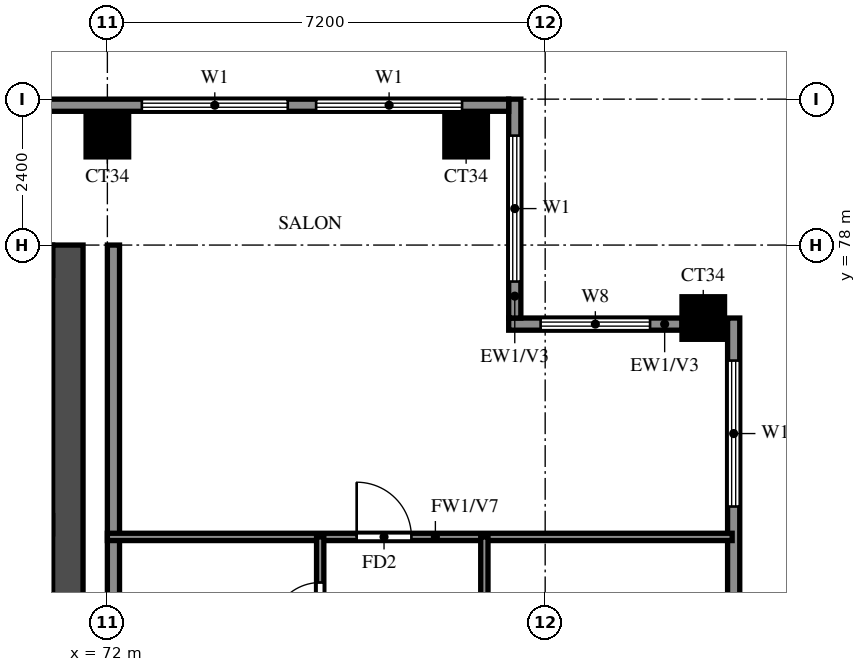
"""IFC4 building model, lengths in metres.
Left out: names, types, materials, properties, quantities, classifications, styles, units other than length and angle.
Written with IfcOpenShell. Run it as: python <this file> out.ifc"""

import sys

from ifc_helpers import new_model, si_unit, direction, frame, frame_2d, origin, origin_2d, place, context, subcontext, project, spatial, rectangle, extrude, source, transform, mapped, element, fill, save


model = new_model("IFC4")
c1 = context("Model", 3, precision=1e-05, world=origin(), true_north=direction((0.0, 1.0)))
c2 = subcontext(c1, "Body", "Model", "MODEL_VIEW")
j1 = project(units=[si_unit("LENGTHUNIT", "METRE"), si_unit("PLANEANGLEUNIT", "RADIAN")], contexts=[c1])
p1 = place(None, origin())
s1 = spatial("IfcSite", under=j1, at=p1, CompositionType="ELEMENT")
p2 = place(p1, origin())
s2 = spatial("IfcBuilding", under=s1, at=p2, CompositionType="ELEMENT")
p3 = place(p2, frame((0.0, 0.0, 218.5)))
s3 = spatial("IfcBuildingStorey", under=s2, at=p3, CompositionType="ELEMENT", Elevation=218.5)
m1 = source(origin(), c2, "Body", "SweptSolid", [
    extrude(rectangle(XDim=0.7, YDim=0.7, at=origin_2d()), origin(), (0.0, 0.0, 1.0), 3.22),
])
for number, where, z_axis, x_axis in (
    (1, (81.8, 76.8, 0.0), (0.0, 0.0, 1.0), (1.0, 0.0, 0.0)),
    (2, (72.0, 79.8, 0.0), (0.0, 0.0, 1.0), (1.0, 0.0, 0.0)),
    (3, (77.9, 79.8, 0.0), (0.0, 0.0, 1.0), (1.0, 0.0, 0.0)),
):
    element("IfcColumn", number, at=place(p3, frame(where, z_axis=z_axis, x_axis=x_axis)), inside=s3, PredefinedType="COLUMN", context=c2, shape_type="MappedRepresentation", body=[
        mapped(m1, transform((0.0, 0.0, 0.0))),
    ])
p4 = place(p3, frame((71.35, 66.15, 0.0), z_axis=(0.0, 0.0, 1.0), x_axis=(0.0, 1.0, 0.0)))
e4 = element("IfcWall", 4, at=p4, inside=s3, PredefinedType="SHEAR", context=c2, shape_type="SweptSolid", body=[
    extrude(rectangle(XDim=11.85, YDim=0.5, at=frame_2d((5.925, 0.0))), origin(), (0.0, 0.0, 1.0), 3.22),
])
p5 = place(p3, frame((29.7, 77.75, 0.0), z_axis=(0.0, 0.0, 1.0), x_axis=(1.0, 0.0, 0.0)))
e5 = element("IfcWall", 5, at=p5, inside=s3, PredefinedType="SHEAR", context=c2, shape_type="SweptSolid", body=[
    extrude(rectangle(XDim=41.4, YDim=0.5, at=frame_2d((20.7, 0.0))), origin(), (0.0, 0.0, 1.0), 3.22),
])
p6 = place(p3, frame((82.3, 62.4, 0.0), z_axis=(0.0, 0.0, 1.0), x_axis=(0.0, 1.0, 0.0)))
e6 = element("IfcWall", 6, at=p6, inside=s3, PredefinedType="SOLIDWALL", context=c2, shape_type="SweptSolid", body=[
    extrude(rectangle(XDim=14.4, YDim=0.2, at=frame_2d((7.2, 0.0))), origin(), (0.0, 0.0, 1.0), 3.22),
])
p7 = place(p6, frame((0.967, 0.0, 0.6)))
e7 = element("IfcOpeningElement", 7, at=p7, cuts=e6, PredefinedType="OPENING", context=c2, shape_type="SweptSolid", body=[
    extrude(rectangle(XDim=2.4, YDim=2.4, at=frame_2d((1.2, 1.2))), frame((0.0, 0.11, 0.0), z_axis=(0.0, -1.0, 0.0), x_axis=(1.0, 0.0, 0.0)), (0.0, 0.0, 1.0), 0.22),
])
p8 = place(p6, frame((4.033, 0.0, 0.6)))
e8 = element("IfcOpeningElement", 8, at=p8, cuts=e6, PredefinedType="OPENING", context=c2, shape_type="SweptSolid", body=[
    extrude(rectangle(XDim=2.4, YDim=2.4, at=frame_2d((1.2, 1.2))), frame((0.0, 0.11, 0.0), z_axis=(0.0, -1.0, 0.0), x_axis=(1.0, 0.0, 0.0)), (0.0, 0.0, 1.0), 0.22),
])
p9 = place(p6, frame((8.55, 0.0, 1.5)))
e9 = element("IfcOpeningElement", 9, at=p9, cuts=e6, PredefinedType="OPENING", context=c2, shape_type="SweptSolid", body=[
    extrude(rectangle(XDim=0.9, YDim=0.9, at=frame_2d((0.45, 0.45))), frame((0.0, 0.11, 0.0), z_axis=(0.0, -1.0, 0.0), x_axis=(1.0, 0.0, 0.0)), (0.0, 0.0, 1.0), 0.22),
])
p10 = place(p6, frame((11.3, 0.0, 0.6)))
e10 = element("IfcOpeningElement", 10, at=p10, cuts=e6, PredefinedType="OPENING", context=c2, shape_type="SweptSolid", body=[
    extrude(rectangle(XDim=2.4, YDim=2.4, at=frame_2d((1.2, 1.2))), frame((0.0, 0.11, 0.0), z_axis=(0.0, -1.0, 0.0), x_axis=(1.0, 0.0, 0.0)), (0.0, 0.0, 1.0), 0.22),
])
p11 = place(p3, frame((81.45, 76.7, 0.0), z_axis=(0.0, 0.0, 1.0), x_axis=(-1.0, 0.0, 0.0)))
e11 = element("IfcWall", 11, at=p11, inside=s3, PredefinedType="SOLIDWALL", context=c2, shape_type="SweptSolid", body=[
    extrude(rectangle(XDim=2.85, YDim=0.2, at=frame_2d((1.425, 0.0))), origin(), (0.0, 0.0, 1.0), 3.22),
])
p12 = place(p11, frame((0.525, 0.0, 0.6)))
e12 = element("IfcOpeningElement", 12, at=p12, cuts=e11, PredefinedType="OPENING", context=c2, shape_type="SweptSolid", body=[
    extrude(rectangle(XDim=1.8, YDim=2.4, at=frame_2d((0.9, 1.2))), frame((0.0, 0.11, 0.0), z_axis=(0.0, -1.0, 0.0), x_axis=(1.0, 0.0, 0.0)), (0.0, 0.0, 1.0), 0.22),
])
p13 = place(p3, frame((78.7, 76.8, 0.0), z_axis=(0.0, 0.0, 1.0), x_axis=(0.0, 1.0, 0.0)))
e13 = element("IfcWall", 13, at=p13, inside=s3, PredefinedType="SOLIDWALL", context=c2, shape_type="SweptSolid", body=[
    extrude(rectangle(XDim=3.6, YDim=0.2, at=frame_2d((1.8, 0.0))), origin(), (0.0, 0.0, 1.0), 3.22),
])
p14 = place(p13, frame((0.6, 0.0, 0.6)))
e14 = element("IfcOpeningElement", 14, at=p14, cuts=e13, PredefinedType="OPENING", context=c2, shape_type="SweptSolid", body=[
    extrude(rectangle(XDim=2.4, YDim=2.4, at=frame_2d((1.2, 1.2))), frame((0.0, 0.11, 0.0), z_axis=(0.0, -1.0, 0.0), x_axis=(1.0, 0.0, 0.0)), (0.0, 0.0, 1.0), 0.22),
])
p15 = place(p3, frame((78.6, 80.3, 0.0), z_axis=(0.0, 0.0, 1.0), x_axis=(-1.0, 0.0, 0.0)))
e15 = element("IfcWall", 15, at=p15, inside=s3, PredefinedType="SOLIDWALL", context=c2, shape_type="SweptSolid", body=[
    extrude(rectangle(XDim=56.6, YDim=0.2, at=frame_2d((28.3, 0.0))), origin(), (0.0, 0.0, 1.0), 3.22),
])
p16 = place(p15, frame((50.7, 0.0, 0.0)))
e16 = element("IfcOpeningElement", 16, at=p16, cuts=e15, PredefinedType="OPENING", context=c2, shape_type="SweptSolid", body=[
    extrude(rectangle(XDim=1.8, YDim=2.4, at=frame_2d((0.9, 1.2))), frame((0.0, 0.11, 0.0), z_axis=(0.0, -1.0, 0.0), x_axis=(1.0, 0.0, 0.0)), (0.0, 0.0, 1.0), 0.22),
])
p17 = place(p15, frame((52.95, 0.0, 0.6)))
e17 = element("IfcOpeningElement", 17, at=p17, cuts=e15, PredefinedType="OPENING", context=c2, shape_type="SweptSolid", body=[
    extrude(rectangle(XDim=0.9, YDim=2.4, at=frame_2d((0.45, 1.2))), frame((0.0, 0.11, 0.0), z_axis=(0.0, -1.0, 0.0), x_axis=(1.0, 0.0, 0.0)), (0.0, 0.0, 1.0), 0.22),
])
p18 = place(p15, frame((54.9, 0.0, 0.6)))
e18 = element("IfcOpeningElement", 18, at=p18, cuts=e15, PredefinedType="OPENING", context=c2, shape_type="SweptSolid", body=[
    extrude(rectangle(XDim=1.2, YDim=2.4, at=frame_2d((0.6, 1.2))), frame((0.0, 0.11, 0.0), z_axis=(0.0, -1.0, 0.0), x_axis=(1.0, 0.0, 0.0)), (0.0, 0.0, 1.0), 0.22),
])
p19 = place(p15, frame((0.767, 0.0, 0.6)))
e19 = element("IfcOpeningElement", 19, at=p19, cuts=e15, PredefinedType="OPENING", context=c2, shape_type="SweptSolid", body=[
    extrude(rectangle(XDim=2.4, YDim=2.4, at=frame_2d((1.2, 1.2))), frame((0.0, 0.11, 0.0), z_axis=(0.0, -1.0, 0.0), x_axis=(1.0, 0.0, 0.0)), (0.0, 0.0, 1.0), 0.22),
])
p20 = place(p15, frame((3.633, 0.0, 0.6)))
e20 = element("IfcOpeningElement", 20, at=p20, cuts=e15, PredefinedType="OPENING", context=c2, shape_type="SweptSolid", body=[
    extrude(rectangle(XDim=2.4, YDim=2.4, at=frame_2d((1.2, 1.2))), frame((0.0, 0.11, 0.0), z_axis=(0.0, -1.0, 0.0), x_axis=(1.0, 0.0, 0.0)), (0.0, 0.0, 1.0), 0.22),
])
p21 = place(p3, frame((72.1, 62.4, 0.0), z_axis=(0.0, 0.0, 1.0), x_axis=(0.0, 1.0, 0.0)))
e21 = element("IfcWall", 21, at=p21, inside=s3, PredefinedType="SOLIDWALL", context=c2, shape_type="SweptSolid", body=[
    extrude(rectangle(XDim=15.6, YDim=0.2, at=frame_2d((7.8, 0.0))), origin(), (0.0, 0.0, 1.0), 3.22),
])
p22 = place(p3, frame((72.0, 73.2, 0.0), z_axis=(0.0, 0.0, 1.0), x_axis=(1.0, 0.0, 0.0)))
e22 = element("IfcWall", 22, at=p22, inside=s3, PredefinedType="PARTITIONING", context=c2, shape_type="SweptSolid", body=[
    extrude(rectangle(XDim=10.275, YDim=0.12, at=frame_2d((5.137, 0.0))), origin(), (0.0, 0.0, 1.0), 2.32),
])
p23 = place(p22, frame((4.1, 0.0, 0.0)))
e23 = element("IfcOpeningElement", 23, at=p23, cuts=e22, PredefinedType="OPENING", context=c2, shape_type="SweptSolid", body=[
    extrude(rectangle(XDim=0.9, YDim=2.1, at=frame_2d((0.45, 1.05))), frame((0.0, 0.07, 0.0), z_axis=(0.0, -1.0, 0.0), x_axis=(1.0, 0.0, 0.0)), (0.0, 0.0, 1.0), 0.14),
])
p24 = place(p3, frame((75.5, 61.2, 0.0), z_axis=(0.0, 0.0, 1.0), x_axis=(0.0, 1.0, 0.0)))
e24 = element("IfcWall", 24, at=p24, inside=s3, PredefinedType="PARTITIONING", context=c2, shape_type="SweptSolid", body=[
    extrude(rectangle(XDim=12.0, YDim=0.12, at=frame_2d((6.0, 0.0))), origin(), (0.0, 0.0, 1.0), 3.22),
])
p25 = place(p24, frame((4.2, 0.0, 0.0)))
e25 = element("IfcOpeningElement", 25, at=p25, cuts=e24, PredefinedType="OPENING", context=c2, shape_type="SweptSolid", body=[
    extrude(rectangle(XDim=0.9, YDim=2.1, at=frame_2d((0.45, 1.05))), frame((0.0, 0.07, 0.0), z_axis=(0.0, -1.0, 0.0), x_axis=(1.0, 0.0, 0.0)), (0.0, 0.0, 1.0), 0.14),
])
p26 = place(p24, frame((7.975, 0.0, 0.0)))
e26 = element("IfcOpeningElement", 26, at=p26, cuts=e24, PredefinedType="OPENING", context=c2, shape_type="SweptSolid", body=[
    extrude(rectangle(XDim=0.8, YDim=2.1, at=frame_2d((0.4, 1.05))), frame((0.0, 0.07, 0.0), z_axis=(0.0, -1.0, 0.0), x_axis=(1.0, 0.0, 0.0)), (0.0, 0.0, 1.0), 0.14),
])
p27 = place(p24, frame((10.45, 0.0, 0.0)))
e27 = element("IfcOpeningElement", 27, at=p27, cuts=e24, PredefinedType="OPENING", context=c2, shape_type="SweptSolid", body=[
    extrude(rectangle(XDim=0.8, YDim=2.1, at=frame_2d((0.4, 1.05))), frame((0.0, 0.07, 0.0), z_axis=(0.0, -1.0, 0.0), x_axis=(1.0, 0.0, 0.0)), (0.0, 0.0, 1.0), 0.14),
])
p28 = place(p3, frame((78.2, 69.6, 0.0), z_axis=(0.0, 0.0, 1.0), x_axis=(0.0, 1.0, 0.0)))
e28 = element("IfcWall", 28, at=p28, inside=s3, PredefinedType="PARTITIONING", context=c2, shape_type="SweptSolid", body=[
    extrude(rectangle(XDim=3.6, YDim=0.12, at=frame_2d((1.8, 0.0))), origin(), (0.0, 0.0, 1.0), 3.22),
])
p29 = place(p10, origin())
e29 = element("IfcWindow", 29, at=p29, inside=s3, PartitioningType="DOUBLE_PANEL_VERTICAL", PredefinedType="WINDOW", context=c2, shape_type="SweptSolid", body=[
    extrude(rectangle(XDim=2.4, YDim=2.4, at=frame_2d((1.2, 1.2))), frame((0.0, 0.03, 0.0), z_axis=(0.0, -1.0, 0.0), x_axis=(1.0, 0.0, 0.0)), (0.0, 0.0, 1.0), 0.06),
])
fill(e10, e29)
p30 = place(p12, origin())
e30 = element("IfcWindow", 30, at=p30, inside=s3, PartitioningType="DOUBLE_PANEL_VERTICAL", PredefinedType="WINDOW", context=c2, shape_type="SweptSolid", body=[
    extrude(rectangle(XDim=1.8, YDim=2.4, at=frame_2d((0.9, 1.2))), frame((0.0, 0.03, 0.0), z_axis=(0.0, -1.0, 0.0), x_axis=(1.0, 0.0, 0.0)), (0.0, 0.0, 1.0), 0.06),
])
fill(e12, e30)
p31 = place(p14, origin())
e31 = element("IfcWindow", 31, at=p31, inside=s3, PartitioningType="DOUBLE_PANEL_VERTICAL", PredefinedType="WINDOW", context=c2, shape_type="SweptSolid", body=[
    extrude(rectangle(XDim=2.4, YDim=2.4, at=frame_2d((1.2, 1.2))), frame((0.0, 0.03, 0.0), z_axis=(0.0, -1.0, 0.0), x_axis=(1.0, 0.0, 0.0)), (0.0, 0.0, 1.0), 0.06),
])
fill(e14, e31)
p32 = place(p19, origin())
e32 = element("IfcWindow", 32, at=p32, inside=s3, PartitioningType="DOUBLE_PANEL_VERTICAL", PredefinedType="WINDOW", context=c2, shape_type="SweptSolid", body=[
    extrude(rectangle(XDim=2.4, YDim=2.4, at=frame_2d((1.2, 1.2))), frame((0.0, 0.03, 0.0), z_axis=(0.0, -1.0, 0.0), x_axis=(1.0, 0.0, 0.0)), (0.0, 0.0, 1.0), 0.06),
])
fill(e19, e32)
p33 = place(p20, origin())
e33 = element("IfcWindow", 33, at=p33, inside=s3, PartitioningType="DOUBLE_PANEL_VERTICAL", PredefinedType="WINDOW", context=c2, shape_type="SweptSolid", body=[
    extrude(rectangle(XDim=2.4, YDim=2.4, at=frame_2d((1.2, 1.2))), frame((0.0, 0.03, 0.0), z_axis=(0.0, -1.0, 0.0), x_axis=(1.0, 0.0, 0.0)), (0.0, 0.0, 1.0), 0.06),
])
fill(e20, e33)
p34 = place(p23, origin())
e34 = element("IfcDoor", 34, at=p34, inside=s3, OperationType="SINGLE_SWING_LEFT", PredefinedType="DOOR", context=c2, shape_type="SweptSolid", body=[
    extrude(rectangle(XDim=0.9, YDim=2.1, at=frame_2d((0.45, 1.05))), frame((0.0, 0.025, 0.0), z_axis=(0.0, -1.0, 0.0), x_axis=(1.0, 0.0, 0.0)), (0.0, 0.0, 1.0), 0.05),
])
fill(e23, e34)
p35 = place(p27, origin())
e35 = element("IfcDoor", 35, at=p35, inside=s3, OperationType="SINGLE_SWING_RIGHT", PredefinedType="DOOR", context=c2, shape_type="SweptSolid", body=[
    extrude(rectangle(XDim=0.8, YDim=2.1, at=frame_2d((0.4, 1.05))), frame((0.0, 0.025, 0.0), z_axis=(0.0, -1.0, 0.0), x_axis=(1.0, 0.0, 0.0)), (0.0, 0.0, 1.0), 0.05),
])
fill(e27, e35)
save(model, sys.argv[1])
